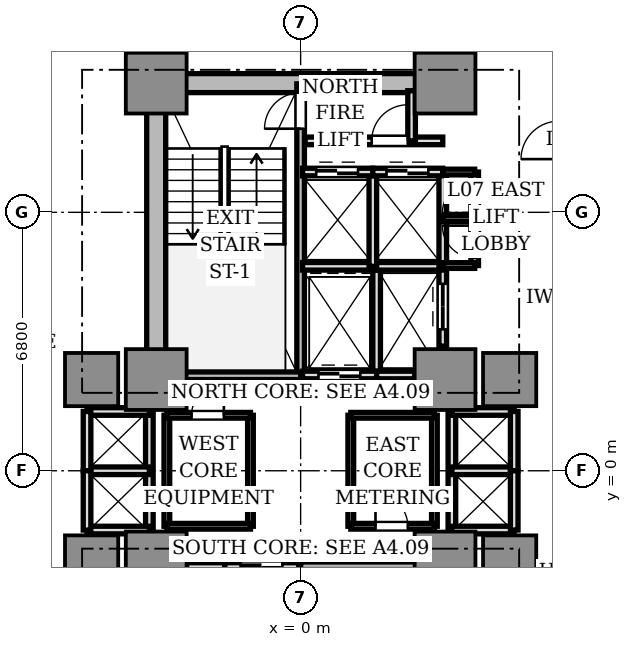
"""IFC4 building model, lengths in metres.
Left out: names, types, materials, properties, quantities, classifications, styles, units other than length and angle.
Written with IfcOpenShell. Run it as: python <this file> out.ifc"""

import sys

from ifc_helpers import new_model, si_unit, direction, frame, frame_2d, origin, origin_2d, place, context, subcontext, project, spatial, rectangle, extrude, source, transform, mapped, element, fill, save


model = new_model("IFC4")
c1 = context("Model", 3, precision=1e-05, world=origin(), true_north=direction((0.0, 1.0)))
c2 = subcontext(c1, "Body", "Model", "MODEL_VIEW")
j1 = project(units=[si_unit("LENGTHUNIT", "METRE"), si_unit("PLANEANGLEUNIT", "RADIAN")], contexts=[c1])
p1 = place(None, origin())
s1 = spatial("IfcSite", under=j1, at=p1, CompositionType="ELEMENT")
p2 = place(p1, origin())
s2 = spatial("IfcBuilding", under=s1, at=p2, CompositionType="ELEMENT")
p3 = place(p2, frame((0.0, 0.0, 29.8)))
s3 = spatial("IfcBuildingStorey", under=s2, at=p3, CompositionType="ELEMENT", Elevation=29.8)
p4 = place(p3, frame((-3.55, 10.2, 0.0), z_axis=(0.0, 0.0, 1.0), x_axis=(1.0, 0.0, 0.0)))
e1 = element("IfcWall", 1, at=p4, inside=s3, PredefinedType="SHEAR", context=c2, shape_type="SweptSolid", body=[
    extrude(rectangle(XDim=7.1, YDim=0.5, at=frame_2d((3.55, 0.0))), origin(), (0.0, 0.0, 1.0), 3.11),
])
p5 = place(p3, frame((-3.8, 2.85, 0.0), z_axis=(0.0, 0.0, 1.0), x_axis=(0.0, 1.0, 0.0)))
e2 = element("IfcWall", 2, at=p5, inside=s3, PredefinedType="SHEAR", context=c2, shape_type="SweptSolid", body=[
    extrude(rectangle(XDim=6.9, YDim=0.5, at=frame_2d((3.45, 0.0))), origin(), (0.0, 0.0, 1.0), 3.11),
])
m1 = source(origin(), c2, "Body", "SweptSolid", [
    extrude(rectangle(XDim=1.6, YDim=1.6, at=origin_2d()), origin(), (0.0, 0.0, 1.0), 3.11),
])
for number, where, z_axis, x_axis in (
    (3, (-3.8, 2.4, 0.0), (0.0, 0.0, 1.0), (1.0, 0.0, 0.0)),
    (4, (3.8, 2.4, 0.0), (0.0, 0.0, 1.0), (1.0, 0.0, 0.0)),
    (5, (-3.8, 10.2, 0.0), (0.0, 0.0, 1.0), (1.0, 0.0, 0.0)),
    (6, (3.8, 10.2, 0.0), (0.0, 0.0, 1.0), (1.0, 0.0, 0.0)),
    (7, (-3.8, -2.4, 0.0), (0.0, 0.0, 1.0), (1.0, 0.0, 0.0)),
    (8, (3.8, -2.4, 0.0), (0.0, 0.0, 1.0), (1.0, 0.0, 0.0)),
):
    element("IfcColumn", number, at=place(p3, frame(where, z_axis=z_axis, x_axis=x_axis)), inside=s3, PredefinedType="COLUMN", context=c2, shape_type="MappedRepresentation", body=[
        mapped(m1, transform((0.0, 0.0, 0.0), scale=1.0)),
    ])
m2 = source(origin(), c2, "Body", "SweptSolid", [
    extrude(rectangle(XDim=1.4, YDim=1.4, at=origin_2d()), origin(), (0.0, 0.0, 1.0), 3.11),
])
for number, where, z_axis, x_axis in (
    (9, (5.5, 2.4, 0.0), (0.0, 0.0, 1.0), (1.0, 0.0, 0.0)),
    (10, (-5.5, 2.4, 0.0), (0.0, 0.0, 1.0), (1.0, 0.0, 0.0)),
    (11, (5.5, -2.4, 0.0), (0.0, 0.0, 1.0), (1.0, 0.0, 0.0)),
    (12, (-5.5, -2.4, 0.0), (0.0, 0.0, 1.0), (1.0, 0.0, 0.0)),
):
    element("IfcColumn", number, at=place(p3, frame(where, z_axis=z_axis, x_axis=x_axis)), inside=s3, PredefinedType="COLUMN", context=c2, shape_type="MappedRepresentation", body=[
        mapped(m2, transform((0.0, 0.0, 0.0), scale=1.0)),
    ])
p6 = place(p3, frame((0.0, 2.5, 0.0), z_axis=(0.0, 0.0, 1.0), x_axis=(0.0, 1.0, 0.0)))
e13 = element("IfcWall", 13, at=p6, inside=s3, PredefinedType="SOLIDWALL", context=c2, shape_type="SweptSolid", body=[
    extrude(rectangle(XDim=7.68, YDim=0.2, at=frame_2d((3.84, 0.0))), origin(), (0.0, 0.0, 1.0), 3.11),
])
p7 = place(p6, frame((6.5, 0.0, 0.0)))
e14 = element("IfcOpeningElement", 14, at=p7, cuts=e13, PredefinedType="OPENING", context=c2, shape_type="SweptSolid", body=[
    extrude(rectangle(XDim=0.95, YDim=2.15, at=frame_2d((0.475, 1.075))), frame((0.0, 0.11, 0.0), z_axis=(0.0, -1.0, 0.0), x_axis=(1.0, 0.0, 0.0)), (0.0, 0.0, 1.0), 0.22),
])
p8 = place(p3, frame((-3.72, 2.5, 0.0), z_axis=(0.0, 0.0, 1.0), x_axis=(1.0, 0.0, 0.0)))
e15 = element("IfcWall", 15, at=p8, inside=s3, PredefinedType="SOLIDWALL", context=c2, shape_type="SweptSolid", body=[
    extrude(rectangle(XDim=3.72, YDim=0.2, at=frame_2d((1.86, 0.0))), origin(), (0.0, 0.0, 1.0), 3.11),
])
p9 = place(p3, frame((0.0, -10.18, 0.0), z_axis=(0.0, 0.0, 1.0), x_axis=(0.0, 1.0, 0.0)))
e16 = element("IfcWall", 16, at=p9, inside=s3, PredefinedType="SOLIDWALL", context=c2, shape_type="SweptSolid", body=[
    extrude(rectangle(XDim=7.68, YDim=0.2, at=frame_2d((3.84, 0.0))), origin(), (0.0, 0.0, 1.0), 3.11),
])
p10 = place(p9, frame((0.28, 0.0, 0.0)))
e17 = element("IfcOpeningElement", 17, at=p10, cuts=e16, PredefinedType="OPENING", context=c2, shape_type="SweptSolid", body=[
    extrude(rectangle(XDim=1.1, YDim=2.15, at=frame_2d((0.55, 1.075))), frame((0.0, 0.11, 0.0), z_axis=(0.0, -1.0, 0.0), x_axis=(1.0, 0.0, 0.0)), (0.0, 0.0, 1.0), 0.22),
])
p11 = place(p3, frame((0.0, -2.5, 0.0), z_axis=(0.0, 0.0, 1.0), x_axis=(1.0, 0.0, 0.0)))
e18 = element("IfcWall", 18, at=p11, inside=s3, PredefinedType="SOLIDWALL", context=c2, shape_type="SweptSolid", body=[
    extrude(rectangle(XDim=3.72, YDim=0.2, at=frame_2d((1.86, 0.0))), origin(), (0.0, 0.0, 1.0), 3.11),
])
p12 = place(p3, frame((2.0, 2.5, 0.0), z_axis=(0.0, 0.0, 1.0), x_axis=(0.0, 1.0, 0.0)))
e19 = element("IfcWall", 19, at=p12, inside=s3, PredefinedType="SOLIDWALL", context=c2, shape_type="SweptSolid", body=[
    extrude(rectangle(XDim=2.78, YDim=0.2, at=frame_2d((1.39, 0.0))), origin(), (0.0, 0.0, 1.0), 2.66),
])
p13 = place(p3, frame((0.05, 2.52, 0.0), z_axis=(0.0, 0.0, 1.0), x_axis=(1.0, 0.0, 0.0)))
e20 = element("IfcWall", 20, at=p13, inside=s3, PredefinedType="SOLIDWALL", context=c2, shape_type="SweptSolid", body=[
    extrude(rectangle(XDim=1.95, YDim=0.2, at=frame_2d((0.975, 0.0))), origin(), (0.0, 0.0, 1.0), 2.66),
])
p14 = place(p13, frame((0.42, 0.0, 0.0)))
e21 = element("IfcOpeningElement", 21, at=p14, cuts=e20, PredefinedType="OPENING", context=c2, shape_type="SweptSolid", body=[
    extrude(rectangle(XDim=1.1, YDim=2.2, at=frame_2d((0.55, 1.1))), frame((0.0, 0.11, 0.0), z_axis=(0.0, -1.0, 0.0), x_axis=(1.0, 0.0, 0.0)), (0.0, 0.0, 1.0), 0.22),
])
p15 = place(p3, frame((-2.0, -5.28, 0.0), z_axis=(0.0, 0.0, 1.0), x_axis=(0.0, 1.0, 0.0)))
e22 = element("IfcWall", 22, at=p15, inside=s3, PredefinedType="SOLIDWALL", context=c2, shape_type="SweptSolid", body=[
    extrude(rectangle(XDim=2.78, YDim=0.2, at=frame_2d((1.39, 0.0))), origin(), (0.0, 0.0, 1.0), 2.66),
])
p16 = place(p3, frame((-2.0, -2.52, 0.0), z_axis=(0.0, 0.0, 1.0), x_axis=(1.0, 0.0, 0.0)))
e23 = element("IfcWall", 23, at=p16, inside=s3, PredefinedType="SOLIDWALL", context=c2, shape_type="SweptSolid", body=[
    extrude(rectangle(XDim=1.95, YDim=0.2, at=frame_2d((0.975, 0.0))), origin(), (0.0, 0.0, 1.0), 2.66),
])
p17 = place(p16, frame((0.42, 0.0, 0.0)))
e24 = element("IfcOpeningElement", 24, at=p17, cuts=e23, PredefinedType="OPENING", context=c2, shape_type="SweptSolid", body=[
    extrude(rectangle(XDim=1.1, YDim=2.2, at=frame_2d((0.55, 1.1))), frame((0.0, 0.11, 0.0), z_axis=(0.0, -1.0, 0.0), x_axis=(1.0, 0.0, 0.0)), (0.0, 0.0, 1.0), 0.22),
])
p18 = place(p3, frame((2.0, 2.52, 0.0), z_axis=(0.0, 0.0, 1.0), x_axis=(1.0, 0.0, 0.0)))
e25 = element("IfcWall", 25, at=p18, inside=s3, PredefinedType="SOLIDWALL", context=c2, shape_type="SweptSolid", body=[
    extrude(rectangle(XDim=1.0, YDim=0.2, at=frame_2d((0.5, 0.0))), origin(), (0.0, 0.0, 1.0), 2.66),
])
p19 = place(p3, frame((3.74, 3.28, 0.0), z_axis=(0.0, 0.0, 1.0), x_axis=(0.0, 1.0, 0.0)))
e26 = element("IfcWall", 26, at=p19, inside=s3, PredefinedType="SOLIDWALL", context=c2, shape_type="SweptSolid", body=[
    extrude(rectangle(XDim=2.08, YDim=0.2, at=frame_2d((1.04, 0.0))), origin(), (0.0, 0.0, 1.0), 2.66),
])
p20 = place(p19, frame((0.44, 0.0, 0.0)))
e27 = element("IfcOpeningElement", 27, at=p20, cuts=e26, PredefinedType="OPENING", context=c2, shape_type="SweptSolid", body=[
    extrude(rectangle(XDim=1.2, YDim=2.2, at=frame_2d((0.6, 1.1))), frame((0.0, 0.11, 0.0), z_axis=(0.0, -1.0, 0.0), x_axis=(1.0, 0.0, 0.0)), (0.0, 0.0, 1.0), 0.22),
])
p21 = place(p3, frame((-3.0, -2.52, 0.0), z_axis=(0.0, 0.0, 1.0), x_axis=(1.0, 0.0, 0.0)))
e28 = element("IfcWall", 28, at=p21, inside=s3, PredefinedType="SOLIDWALL", context=c2, shape_type="SweptSolid", body=[
    extrude(rectangle(XDim=1.0, YDim=0.2, at=frame_2d((0.5, 0.0))), origin(), (0.0, 0.0, 1.0), 2.66),
])
p22 = place(p3, frame((0.05, 5.38, 0.0), z_axis=(0.0, 0.0, 1.0), x_axis=(1.0, 0.0, 0.0)))
e29 = element("IfcWall", 29, at=p22, inside=s3, PredefinedType="SOLIDWALL", context=c2, shape_type="SweptSolid", body=[
    extrude(rectangle(XDim=3.69, YDim=0.2, at=frame_2d((1.845, 0.0))), origin(), (0.0, 0.0, 1.0), 2.66),
])
p23 = place(p3, frame((1.9, 5.38, 0.0), z_axis=(0.0, 0.0, 1.0), x_axis=(0.0, 1.0, 0.0)))
e30 = element("IfcWall", 30, at=p23, inside=s3, PredefinedType="SOLIDWALL", context=c2, shape_type="SweptSolid", body=[
    extrude(rectangle(XDim=2.48, YDim=0.2, at=frame_2d((1.24, 0.0))), origin(), (0.0, 0.0, 1.0), 2.66),
])
p24 = place(p3, frame((0.05, 7.86, 0.0), z_axis=(0.0, 0.0, 1.0), x_axis=(1.0, 0.0, 0.0)))
e31 = element("IfcWall", 31, at=p24, inside=s3, PredefinedType="SOLIDWALL", context=c2, shape_type="SweptSolid", body=[
    extrude(rectangle(XDim=1.85, YDim=0.2, at=frame_2d((0.925, 0.0))), origin(), (0.0, 0.0, 1.0), 2.66),
])
p25 = place(p24, frame((0.36, 0.0, 0.0)))
e32 = element("IfcOpeningElement", 32, at=p25, cuts=e31, PredefinedType="OPENING", context=c2, shape_type="SweptSolid", body=[
    extrude(rectangle(XDim=1.1, YDim=2.2, at=frame_2d((0.55, 1.1))), frame((0.0, 0.11, 0.0), z_axis=(0.0, -1.0, 0.0), x_axis=(1.0, 0.0, 0.0)), (0.0, 0.0, 1.0), 0.22),
])
p26 = place(p3, frame((3.74, 5.38, 0.0), z_axis=(0.0, 0.0, 1.0), x_axis=(0.0, 1.0, 0.0)))
e33 = element("IfcWall", 33, at=p26, inside=s3, PredefinedType="SOLIDWALL", context=c2, shape_type="SweptSolid", body=[
    extrude(rectangle(XDim=2.48, YDim=0.2, at=frame_2d((1.24, 0.0))), origin(), (0.0, 0.0, 1.0), 2.66),
])
p27 = place(p3, frame((1.9, 7.86, 0.0), z_axis=(0.0, 0.0, 1.0), x_axis=(1.0, 0.0, 0.0)))
e34 = element("IfcWall", 34, at=p27, inside=s3, PredefinedType="SOLIDWALL", context=c2, shape_type="SweptSolid", body=[
    extrude(rectangle(XDim=1.84, YDim=0.2, at=frame_2d((0.92, 0.0))), origin(), (0.0, 0.0, 1.0), 2.66),
])
p28 = place(p27, frame((0.36, 0.0, 0.0)))
e35 = element("IfcOpeningElement", 35, at=p28, cuts=e34, PredefinedType="OPENING", context=c2, shape_type="SweptSolid", body=[
    extrude(rectangle(XDim=1.1, YDim=2.2, at=frame_2d((0.55, 1.1))), frame((0.0, 0.11, 0.0), z_axis=(0.0, -1.0, 0.0), x_axis=(1.0, 0.0, 0.0)), (0.0, 0.0, 1.0), 0.22),
])
p29 = place(p3, frame((3.98, -1.56, 0.0), z_axis=(0.0, 0.0, 1.0), x_axis=(0.0, 1.0, 0.0)))
e36 = element("IfcWall", 36, at=p29, inside=s3, PredefinedType="SOLIDWALL", context=c2, shape_type="SweptSolid", body=[
    extrude(rectangle(XDim=3.12, YDim=0.2, at=frame_2d((1.56, 0.0))), origin(), (0.0, 0.0, 1.0), 2.18),
])
for number, where, z_axis, x_axis in (
    (37, (3.98, 1.56, 0.0), (0.0, 0.0, 1.0), (1.0, 0.0, 0.0)),
    (38, (3.98, -1.56, 0.0), (0.0, 0.0, 1.0), (1.0, 0.0, 0.0)),
    (39, (3.98, 0.0, 0.0), (0.0, 0.0, 1.0), (1.0, 0.0, 0.0)),
):
    element("IfcWall", number, at=place(p3, frame(where, z_axis=z_axis, x_axis=x_axis)), inside=s3, PredefinedType="SOLIDWALL", context=c2, shape_type="SweptSolid", body=[
        extrude(rectangle(XDim=1.64, YDim=0.2, at=frame_2d((0.82, 0.0))), origin(), (0.0, 0.0, 1.0), 2.66),
    ])
for number, where, z_axis, x_axis in (
    (40, (5.62, 0.0, 0.0), (0.0, 0.0, 1.0), (0.0, 1.0, 0.0)),
    (41, (5.62, -1.56, 0.0), (0.0, 0.0, 1.0), (0.0, 1.0, 0.0)),
):
    element("IfcWall", number, at=place(p3, frame(where, z_axis=z_axis, x_axis=x_axis)), inside=s3, PredefinedType="SOLIDWALL", context=c2, shape_type="SweptSolid", body=[
        extrude(rectangle(XDim=1.56, YDim=0.2, at=frame_2d((0.78, 0.0))), origin(), (0.0, 0.0, 1.0), 2.66),
    ])
p30 = place(p3, frame((-3.98, -1.56, 0.0), z_axis=(0.0, 0.0, 1.0), x_axis=(0.0, 1.0, 0.0)))
e42 = element("IfcWall", 42, at=p30, inside=s3, PredefinedType="SOLIDWALL", context=c2, shape_type="SweptSolid", body=[
    extrude(rectangle(XDim=3.12, YDim=0.2, at=frame_2d((1.56, 0.0))), origin(), (0.0, 0.0, 1.0), 2.18),
])
for number, where, z_axis, x_axis in (
    (43, (-5.62, 1.56, 0.0), (0.0, 0.0, 1.0), (1.0, 0.0, 0.0)),
    (44, (-5.62, -1.56, 0.0), (0.0, 0.0, 1.0), (1.0, 0.0, 0.0)),
    (45, (-5.62, 0.0, 0.0), (0.0, 0.0, 1.0), (1.0, 0.0, 0.0)),
):
    element("IfcWall", number, at=place(p3, frame(where, z_axis=z_axis, x_axis=x_axis)), inside=s3, PredefinedType="SOLIDWALL", context=c2, shape_type="SweptSolid", body=[
        extrude(rectangle(XDim=1.64, YDim=0.2, at=frame_2d((0.82, 0.0))), origin(), (0.0, 0.0, 1.0), 2.66),
    ])
for number, where, z_axis, x_axis in (
    (46, (-5.62, 0.0, 0.0), (0.0, 0.0, 1.0), (0.0, 1.0, 0.0)),
    (47, (-5.62, -1.56, 0.0), (0.0, 0.0, 1.0), (0.0, 1.0, 0.0)),
):
    element("IfcWall", number, at=place(p3, frame(where, z_axis=z_axis, x_axis=x_axis)), inside=s3, PredefinedType="SOLIDWALL", context=c2, shape_type="SweptSolid", body=[
        extrude(rectangle(XDim=1.56, YDim=0.2, at=frame_2d((0.78, 0.0))), origin(), (0.0, 0.0, 1.0), 2.66),
    ])
p31 = place(p3, frame((0.12, 8.68, 0.0), z_axis=(0.0, 0.0, 1.0), x_axis=(1.0, 0.0, 0.0)))
e48 = element("IfcWall", 48, at=p31, inside=s3, PredefinedType="SOLIDWALL", context=c2, shape_type="SweptSolid", body=[
    extrude(rectangle(XDim=3.62, YDim=0.2, at=frame_2d((1.81, 0.0))), origin(), (0.0, 0.0, 1.0), 2.66),
])
p32 = place(p31, frame((1.75, 0.0, 0.0)))
e49 = element("IfcOpeningElement", 49, at=p32, cuts=e48, PredefinedType="OPENING", context=c2, shape_type="SweptSolid", body=[
    extrude(rectangle(XDim=0.95, YDim=2.15, at=frame_2d((0.475, 1.075))), frame((0.0, 0.11, 0.0), z_axis=(0.0, -1.0, 0.0), x_axis=(1.0, 0.0, 0.0)), (0.0, 0.0, 1.0), 0.22),
])
p33 = place(p3, frame((2.92, 8.68, 0.0), z_axis=(0.0, 0.0, 1.0), x_axis=(0.0, 1.0, 0.0)))
e50 = element("IfcWall", 50, at=p33, inside=s3, PredefinedType="SOLIDWALL", context=c2, shape_type="SweptSolid", body=[
    extrude(rectangle(XDim=1.32, YDim=0.2, at=frame_2d((0.66, 0.0))), origin(), (0.0, 0.0, 1.0), 2.66),
])
p34 = place(p3, frame((4.58, 5.4, 0.0), z_axis=(0.0, 0.0, 1.0), x_axis=(0.0, 1.0, 0.0)))
e51 = element("IfcWall", 51, at=p34, inside=s3, PredefinedType="SOLIDWALL", context=c2, shape_type="SweptSolid", body=[
    extrude(rectangle(XDim=2.46, YDim=0.2, at=frame_2d((1.23, 0.0))), origin(), (0.0, 0.0, 1.0), 2.66),
])
p35 = place(p34, frame((0.2, 0.0, 0.0)))
e52 = element("IfcOpeningElement", 52, at=p35, cuts=e51, PredefinedType="OPENING", context=c2, shape_type="SweptSolid", body=[
    extrude(rectangle(XDim=0.85, YDim=2.1, at=frame_2d((0.425, 1.05))), frame((0.0, 0.11, 0.0), z_axis=(0.0, -1.0, 0.0), x_axis=(1.0, 0.0, 0.0)), (0.0, 0.0, 1.0), 0.22),
])
p36 = place(p34, frame((1.38, 0.0, 0.0)))
e53 = element("IfcOpeningElement", 53, at=p36, cuts=e51, PredefinedType="OPENING", context=c2, shape_type="SweptSolid", body=[
    extrude(rectangle(XDim=0.85, YDim=2.1, at=frame_2d((0.425, 1.05))), frame((0.0, 0.11, 0.0), z_axis=(0.0, -1.0, 0.0), x_axis=(1.0, 0.0, 0.0)), (0.0, 0.0, 1.0), 0.22),
])
for number, where, z_axis, x_axis in (
    (54, (3.74, 5.4, 0.0), (0.0, 0.0, 1.0), (1.0, 0.0, 0.0)),
    (55, (3.74, 7.86, 0.0), (0.0, 0.0, 1.0), (1.0, 0.0, 0.0)),
    (56, (3.74, 6.63, 0.0), (0.0, 0.0, 1.0), (1.0, 0.0, 0.0)),
):
    element("IfcWall", number, at=place(p3, frame(where, z_axis=z_axis, x_axis=x_axis)), inside=s3, PredefinedType="PARTITIONING", context=c2, shape_type="SweptSolid", body=[
        extrude(rectangle(XDim=0.84, YDim=0.15, at=frame_2d((0.42, 0.0))), origin(), (0.0, 0.0, 1.0), 2.66),
    ])
p37 = place(p3, frame((-1.32, -1.46, 0.0), z_axis=(0.0, 0.0, 1.0), x_axis=(0.0, 1.0, 0.0)))
e57 = element("IfcWall", 57, at=p37, inside=s3, PredefinedType="PARTITIONING", context=c2, shape_type="SweptSolid", body=[
    extrude(rectangle(XDim=2.92, YDim=0.15, at=frame_2d((1.46, 0.0))), origin(), (0.0, 0.0, 1.0), 2.66),
])
p38 = place(p3, frame((-3.52, -1.46, 0.0), z_axis=(0.0, 0.0, 1.0), x_axis=(0.0, 1.0, 0.0)))
e58 = element("IfcWall", 58, at=p38, inside=s3, PredefinedType="PARTITIONING", context=c2, shape_type="SweptSolid", body=[
    extrude(rectangle(XDim=2.92, YDim=0.15, at=frame_2d((1.46, 0.0))), origin(), (0.0, 0.0, 1.0), 2.18),
])
p39 = place(p3, frame((-3.52, 1.46, 0.0), z_axis=(0.0, 0.0, 1.0), x_axis=(1.0, 0.0, 0.0)))
e59 = element("IfcWall", 59, at=p39, inside=s3, PredefinedType="PARTITIONING", context=c2, shape_type="SweptSolid", body=[
    extrude(rectangle(XDim=2.2, YDim=0.15, at=frame_2d((1.1, 0.0))), origin(), (0.0, 0.0, 1.0), 2.66),
])
p40 = place(p39, frame((0.65, 0.0, 0.0)))
e60 = element("IfcOpeningElement", 60, at=p40, cuts=e59, PredefinedType="OPENING", context=c2, shape_type="SweptSolid", body=[
    extrude(rectangle(XDim=0.85, YDim=2.1, at=frame_2d((0.425, 1.05))), frame((0.0, 0.085, 0.0), z_axis=(0.0, -1.0, 0.0), x_axis=(1.0, 0.0, 0.0)), (0.0, 0.0, 1.0), 0.17),
])
p41 = place(p3, frame((-3.52, -1.46, 0.0), z_axis=(0.0, 0.0, 1.0), x_axis=(1.0, 0.0, 0.0)))
e61 = element("IfcWall", 61, at=p41, inside=s3, PredefinedType="PARTITIONING", context=c2, shape_type="SweptSolid", body=[
    extrude(rectangle(XDim=2.2, YDim=0.15, at=frame_2d((1.1, 0.0))), origin(), (0.0, 0.0, 1.0), 2.66),
])
p42 = place(p3, frame((1.32, -1.46, 0.0), z_axis=(0.0, 0.0, 1.0), x_axis=(0.0, 1.0, 0.0)))
e62 = element("IfcWall", 62, at=p42, inside=s3, PredefinedType="PARTITIONING", context=c2, shape_type="SweptSolid", body=[
    extrude(rectangle(XDim=2.92, YDim=0.15, at=frame_2d((1.46, 0.0))), origin(), (0.0, 0.0, 1.0), 2.66),
])
p43 = place(p3, frame((3.52, -1.46, 0.0), z_axis=(0.0, 0.0, 1.0), x_axis=(0.0, 1.0, 0.0)))
e63 = element("IfcWall", 63, at=p43, inside=s3, PredefinedType="PARTITIONING", context=c2, shape_type="SweptSolid", body=[
    extrude(rectangle(XDim=2.92, YDim=0.15, at=frame_2d((1.46, 0.0))), origin(), (0.0, 0.0, 1.0), 2.18),
])
p44 = place(p3, frame((1.32, 1.46, 0.0), z_axis=(0.0, 0.0, 1.0), x_axis=(1.0, 0.0, 0.0)))
e64 = element("IfcWall", 64, at=p44, inside=s3, PredefinedType="PARTITIONING", context=c2, shape_type="SweptSolid", body=[
    extrude(rectangle(XDim=2.2, YDim=0.15, at=frame_2d((1.1, 0.0))), origin(), (0.0, 0.0, 1.0), 2.66),
])
p45 = place(p3, frame((1.32, -1.46, 0.0), z_axis=(0.0, 0.0, 1.0), x_axis=(1.0, 0.0, 0.0)))
e65 = element("IfcWall", 65, at=p45, inside=s3, PredefinedType="PARTITIONING", context=c2, shape_type="SweptSolid", body=[
    extrude(rectangle(XDim=2.2, YDim=0.15, at=frame_2d((1.1, 0.0))), origin(), (0.0, 0.0, 1.0), 2.66),
])
p46 = place(p45, frame((0.65, 0.0, 0.0)))
e66 = element("IfcOpeningElement", 66, at=p46, cuts=e65, PredefinedType="OPENING", context=c2, shape_type="SweptSolid", body=[
    extrude(rectangle(XDim=0.85, YDim=2.1, at=frame_2d((0.425, 1.05))), frame((0.0, 0.085, 0.0), z_axis=(0.0, -1.0, 0.0), x_axis=(1.0, 0.0, 0.0)), (0.0, 0.0, 1.0), 0.17),
])
m3 = source(origin(), c2, "Body", "SweptSolid", [
    extrude(rectangle(XDim=1.1, YDim=0.05, at=origin_2d()), origin(), (0.0, 0.0, 1.0), 2.2),
])
p47 = place(p14, frame((0.55, 0.0, 0.0)))
e67 = element("IfcDoor", 67, at=p47, inside=s3, OperationType="DOUBLE_DOOR_SLIDING", PredefinedType="DOOR", context=c2, shape_type="MappedRepresentation", body=[
    mapped(m3, transform((0.0, 0.0, 0.0), scale=1.0)),
])
fill(e21, e67)
p48 = place(p17, frame((0.55, 0.0, 0.0)))
e68 = element("IfcDoor", 68, at=p48, inside=s3, OperationType="DOUBLE_DOOR_SLIDING", PredefinedType="DOOR", context=c2, shape_type="MappedRepresentation", body=[
    mapped(m3, transform((0.0, 0.0, 0.0), scale=1.0)),
])
fill(e24, e68)
m4 = source(origin(), c2, "Body", "SweptSolid", [
    extrude(rectangle(XDim=1.2, YDim=0.05, at=origin_2d()), origin(), (0.0, 0.0, 1.0), 2.2),
])
p49 = place(p20, frame((0.6, 0.0, 0.0)))
e69 = element("IfcDoor", 69, at=p49, inside=s3, OperationType="DOUBLE_DOOR_SLIDING", PredefinedType="DOOR", context=c2, shape_type="MappedRepresentation", body=[
    mapped(m4, transform((0.0, 0.0, 0.0), scale=1.0)),
])
fill(e27, e69)
p50 = place(p25, frame((0.55, 0.0, 0.0)))
e70 = element("IfcDoor", 70, at=p50, inside=s3, OperationType="DOUBLE_DOOR_SLIDING", PredefinedType="DOOR", context=c2, shape_type="MappedRepresentation", body=[
    mapped(m3, transform((0.0, 0.0, 0.0), scale=1.0)),
])
fill(e32, e70)
p51 = place(p28, frame((0.55, 0.0, 0.0)))
e71 = element("IfcDoor", 71, at=p51, inside=s3, OperationType="DOUBLE_DOOR_SLIDING", PredefinedType="DOOR", context=c2, shape_type="MappedRepresentation", body=[
    mapped(m3, transform((0.0, 0.0, 0.0), scale=1.0)),
])
fill(e35, e71)
m5 = source(origin(), c2, "Body", "SweptSolid", [
    extrude(rectangle(XDim=0.95, YDim=0.05, at=origin_2d()), origin(), (0.0, 0.0, 1.0), 2.15),
])
p52 = place(p7, frame((0.475, 0.0, 0.0)))
e72 = element("IfcDoor", 72, at=p52, inside=s3, OperationType="SINGLE_SWING_LEFT", PredefinedType="DOOR", context=c2, shape_type="MappedRepresentation", body=[
    mapped(m5, transform((0.0, 0.0, 0.0), scale=1.0)),
])
fill(e14, e72)
p53 = place(p32, frame((0.475, 0.0, 0.0)))
e73 = element("IfcDoor", 73, at=p53, inside=s3, OperationType="SINGLE_SWING_RIGHT", PredefinedType="DOOR", context=c2, shape_type="MappedRepresentation", body=[
    mapped(m5, transform((0.0, 0.0, 0.0), scale=1.0)),
])
fill(e49, e73)
m6 = source(origin(), c2, "Body", "SweptSolid", [
    extrude(rectangle(XDim=0.85, YDim=0.05, at=origin_2d()), origin(), (0.0, 0.0, 1.0), 2.1),
])
p54 = place(p35, frame((0.425, 0.0, 0.0)))
e74 = element("IfcDoor", 74, at=p54, inside=s3, OperationType="SINGLE_SWING_RIGHT", PredefinedType="DOOR", context=c2, shape_type="MappedRepresentation", body=[
    mapped(m6, transform((0.0, 0.0, 0.0), scale=1.0)),
])
fill(e52, e74)
p55 = place(p36, frame((0.425, 0.0, 0.0)))
e75 = element("IfcDoor", 75, at=p55, inside=s3, OperationType="SINGLE_SWING_LEFT", PredefinedType="DOOR", context=c2, shape_type="MappedRepresentation", body=[
    mapped(m6, transform((0.0, 0.0, 0.0), scale=1.0)),
])
fill(e53, e75)
p56 = place(p40, frame((0.425, 0.0, 0.0)))
e76 = element("IfcDoor", 76, at=p56, inside=s3, OperationType="SINGLE_SWING_RIGHT", PredefinedType="DOOR", context=c2, shape_type="MappedRepresentation", body=[
    mapped(m6, transform((0.0, 0.0, 0.0), scale=1.0)),
])
fill(e60, e76)
p57 = place(p46, frame((0.425, 0.0, 0.0)))
e77 = element("IfcDoor", 77, at=p57, inside=s3, OperationType="SINGLE_SWING_LEFT", PredefinedType="DOOR", context=c2, shape_type="MappedRepresentation", body=[
    mapped(m6, transform((0.0, 0.0, 0.0), scale=1.0)),
])
fill(e66, e77)
save(model, sys.argv[1])
